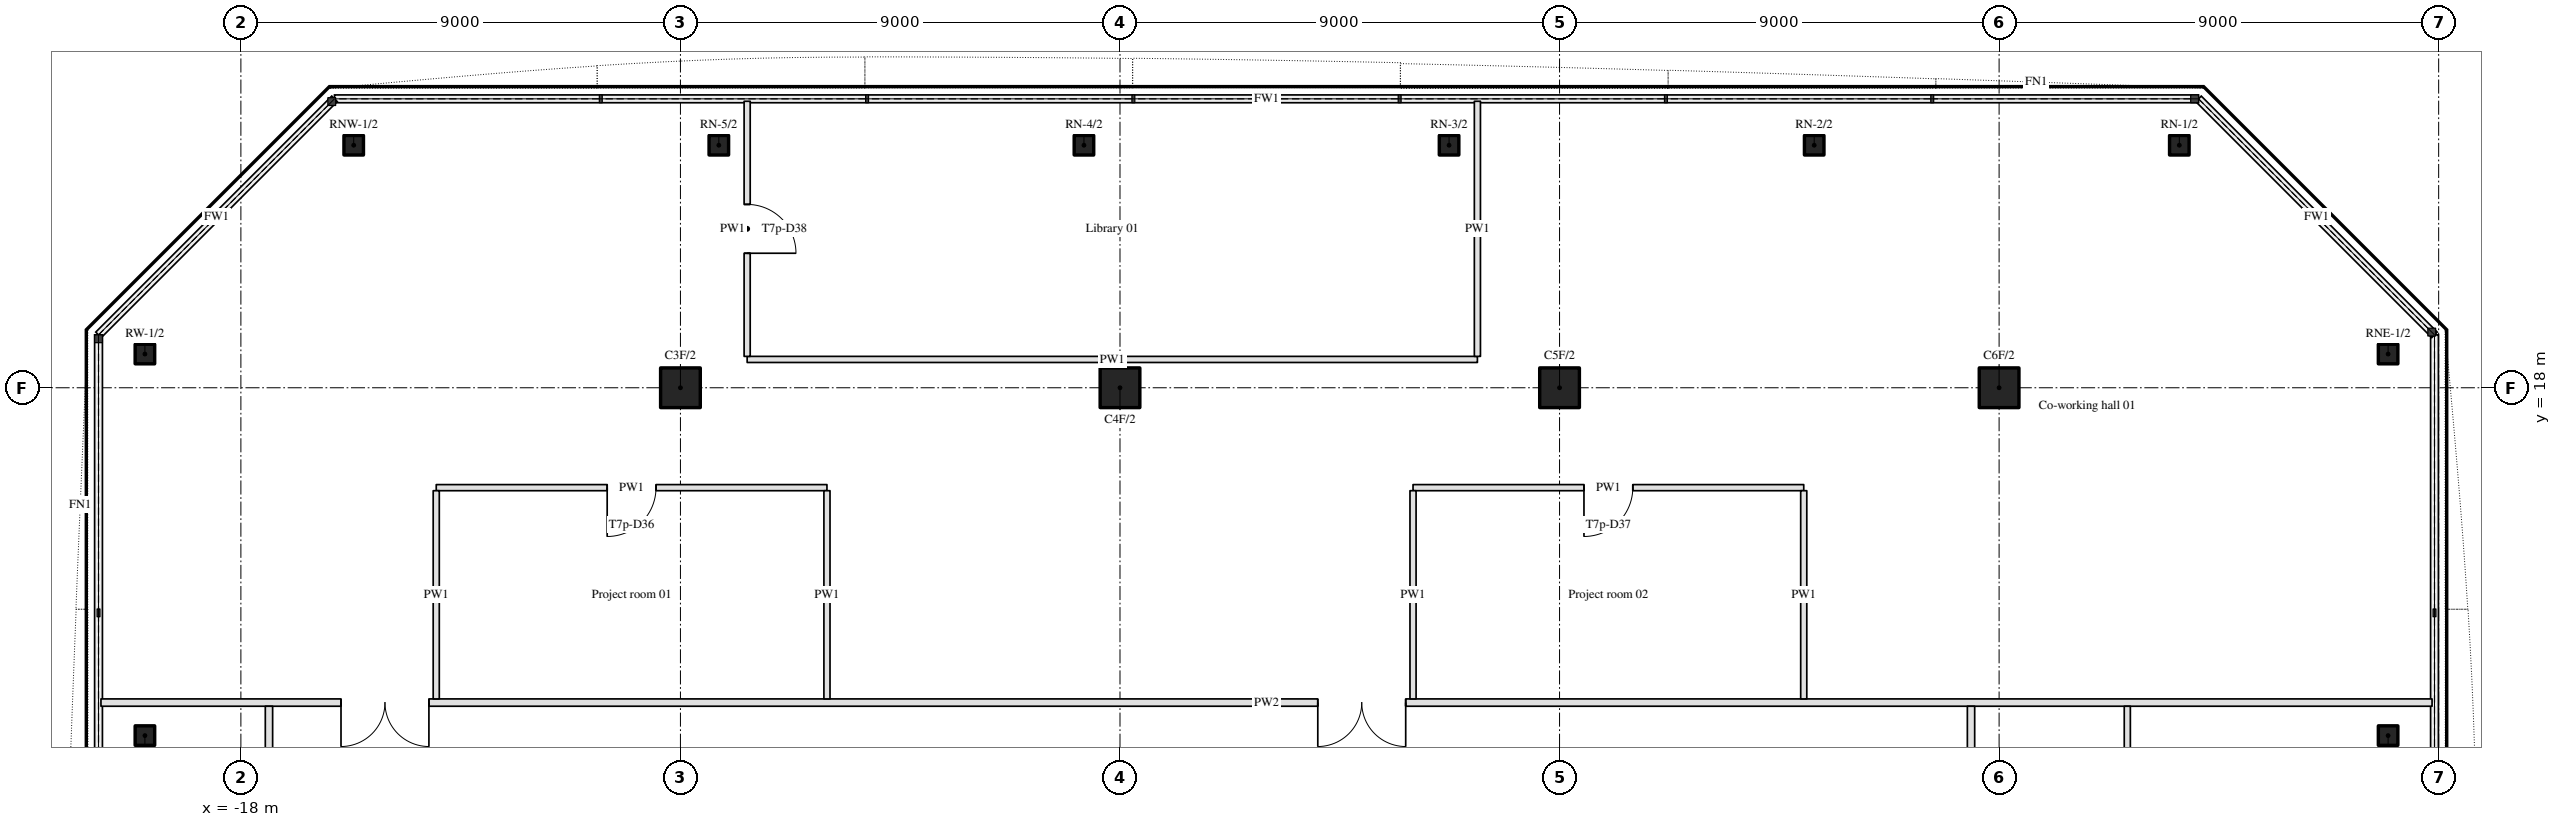
"""IFC4 building model, lengths in metres.
Left out: names, types, materials, properties, quantities, classifications, styles, units other than length and angle.
Written with IfcOpenShell. Run it as: python <this file> out.ifc"""

import sys

from ifc_helpers import new_model, si_unit, direction, frame, frame_2d, origin, origin_2d, place, context, subcontext, project, spatial, rectangle, hollow_rectangle, hollow_circle, extrude, element, fill, save


model = new_model("IFC4")
c1 = context("Model", 3, precision=1e-05, world=origin(), true_north=direction((0.0, 1.0)))
c2 = subcontext(c1, "Body", "Model", "MODEL_VIEW")
j1 = project(units=[si_unit("LENGTHUNIT", "METRE"), si_unit("PLANEANGLEUNIT", "RADIAN")], contexts=[c1])
p1 = place(None, origin())
s1 = spatial("IfcSite", under=j1, at=p1, CompositionType="ELEMENT")
p2 = place(p1, origin())
s2 = spatial("IfcBuilding", under=s1, at=p2, CompositionType="ELEMENT")
p3 = place(p2, frame((0.0, 0.0, 105.0)))
s3 = spatial("IfcBuildingStorey", under=s2, at=p3, CompositionType="ELEMENT", Elevation=105.0)
for number, where, z_axis, x_axis in (
    (1, (-9.0, 18.0, 0.0), (0.0, 0.0, 1.0), (1.0, 0.0, 0.0)),
    (2, (0.0, 18.0, 0.0), (0.0, 0.0, 1.0), (1.0, 0.0, 0.0)),
    (3, (9.0, 18.0, 0.0), (0.0, 0.0, 1.0), (1.0, 0.0, 0.0)),
    (4, (18.0, 18.0, 0.0), (0.0, 0.0, 1.0), (1.0, 0.0, 0.0)),
):
    element("IfcColumn", number, at=place(p3, frame(where, z_axis=z_axis, x_axis=x_axis)), inside=s3, PredefinedType="COLUMN", context=c2, shape_type="SweptSolid", body=[
        extrude(hollow_circle(Radius=0.406, WallThickness=0.036, at=origin_2d()), origin(), (0.0, 0.0, 1.0), 3.9),
    ])
for number, where, z_axis, x_axis in (
    (5, (25.965, 10.879, 0.0), (0.0, 0.0, 1.0), (1.0, 0.0, 0.0)),
    (6, (25.965, 18.69, 0.0), (0.0, 0.0, 1.0), (1.0, 0.0, 0.0)),
    (7, (21.69, 22.965, 0.0), (0.0, 0.0, 1.0), (1.0, 0.0, 0.0)),
    (8, (14.214, 22.965, 0.0), (0.0, 0.0, 1.0), (1.0, 0.0, 0.0)),
    (9, (6.738, 22.965, 0.0), (0.0, 0.0, 1.0), (1.0, 0.0, 0.0)),
    (10, (-0.738, 22.965, 0.0), (0.0, 0.0, 1.0), (1.0, 0.0, 0.0)),
    (11, (-8.214, 22.965, 0.0), (0.0, 0.0, 1.0), (1.0, 0.0, 0.0)),
    (12, (-15.69, 22.965, 0.0), (0.0, 0.0, 1.0), (1.0, 0.0, 0.0)),
    (13, (-19.965, 18.69, 0.0), (0.0, 0.0, 1.0), (1.0, 0.0, 0.0)),
    (14, (-19.965, 10.879, 0.0), (0.0, 0.0, 1.0), (1.0, 0.0, 0.0)),
):
    element("IfcColumn", number, at=place(p3, frame(where, z_axis=z_axis, x_axis=x_axis)), inside=s3, PredefinedType="COLUMN", context=c2, shape_type="SweptSolid", body=[
        extrude(hollow_rectangle(XDim=0.4, YDim=0.4, WallThickness=0.025, InnerFilletRadius=0.038, OuterFilletRadius=0.062, at=origin_2d()), origin(), (0.0, 0.0, 1.0), 3.9),
    ])
p4 = place(p3, frame((26.865, 11.555, 0.0), z_axis=(0.0, 0.0, 1.0), x_axis=(-1.0, 0.0, 0.0)))
e15 = element("IfcWall", 15, at=p4, inside=s3, PredefinedType="PARTITIONING", context=c2, shape_type="SweptSolid", body=[
    extrude(rectangle(XDim=47.73, YDim=0.15, at=frame_2d((23.865, 0.0))), origin(), (0.0, 0.0, 1.0), 2.96),
])
p5 = place(p4, frame((41.015, 0.0, 0.0)))
e16 = element("IfcOpeningElement", 16, at=p5, cuts=e15, PredefinedType="OPENING", context=c2, shape_type="SweptSolid", body=[
    extrude(rectangle(XDim=1.8, YDim=2.1, at=frame_2d((0.9, 1.05))), frame((0.0, 0.085, 0.0), z_axis=(0.0, -1.0, 0.0), x_axis=(1.0, 0.0, 0.0)), (0.0, 0.0, 1.0), 0.17),
])
p6 = place(p4, frame((21.015, 0.0, 0.0)))
e17 = element("IfcOpeningElement", 17, at=p6, cuts=e15, PredefinedType="OPENING", context=c2, shape_type="SweptSolid", body=[
    extrude(rectangle(XDim=1.8, YDim=2.1, at=frame_2d((0.9, 1.05))), frame((0.0, 0.085, 0.0), z_axis=(0.0, -1.0, 0.0), x_axis=(1.0, 0.0, 0.0)), (0.0, 0.0, 1.0), 0.17),
])
p7 = place(p3, frame((-6.0, 15.955, 0.0), z_axis=(0.0, 0.0, 1.0), x_axis=(-1.0, 0.0, 0.0)))
e18 = element("IfcWall", 18, at=p7, inside=s3, PredefinedType="PARTITIONING", context=c2, shape_type="SweptSolid", body=[
    extrude(rectangle(XDim=8.0, YDim=0.125, at=frame_2d((4.0, 0.0))), origin(), (0.0, 0.0, 1.0), 2.96),
])
p8 = place(p7, frame((3.5, 0.0, 0.0)))
e19 = element("IfcOpeningElement", 19, at=p8, cuts=e18, PredefinedType="OPENING", context=c2, shape_type="SweptSolid", body=[
    extrude(rectangle(XDim=1.0, YDim=2.1, at=frame_2d((0.5, 1.05))), frame((0.0, 0.073, 0.0), z_axis=(0.0, -1.0, 0.0), x_axis=(1.0, 0.0, 0.0)), (0.0, 0.0, 1.0), 0.145),
])
p9 = place(p3, frame((14.0, 15.955, 0.0), z_axis=(0.0, 0.0, 1.0), x_axis=(-1.0, 0.0, 0.0)))
e20 = element("IfcWall", 20, at=p9, inside=s3, PredefinedType="PARTITIONING", context=c2, shape_type="SweptSolid", body=[
    extrude(rectangle(XDim=8.0, YDim=0.125, at=frame_2d((4.0, 0.0))), origin(), (0.0, 0.0, 1.0), 2.96),
])
p10 = place(p9, frame((3.5, 0.0, 0.0)))
e21 = element("IfcOpeningElement", 21, at=p10, cuts=e20, PredefinedType="OPENING", context=c2, shape_type="SweptSolid", body=[
    extrude(rectangle(XDim=1.0, YDim=2.1, at=frame_2d((0.5, 1.05))), frame((0.0, 0.073, 0.0), z_axis=(0.0, -1.0, 0.0), x_axis=(1.0, 0.0, 0.0)), (0.0, 0.0, 1.0), 0.145),
])
p11 = place(p3, frame((-7.634, 18.58, 0.0), z_axis=(0.0, 0.0, 1.0), x_axis=(1.0, 0.0, 0.0)))
e22 = element("IfcWall", 22, at=p11, inside=s3, PredefinedType="PARTITIONING", context=c2, shape_type="SweptSolid", body=[
    extrude(rectangle(XDim=14.952, YDim=0.125, at=frame_2d((7.476, 0.0))), origin(), (0.0, 0.0, 1.0), 2.96),
])
p12 = place(p3, frame((-17.425, -14.925, 0.0), z_axis=(0.0, 0.0, 1.0), x_axis=(0.0, 1.0, 0.0)))
e23 = element("IfcWall", 23, at=p12, inside=s3, PredefinedType="PARTITIONING", context=c2, shape_type="SweptSolid", body=[
    extrude(rectangle(XDim=26.405, YDim=0.15, at=frame_2d((13.203, 0.0))), origin(), (0.0, 0.0, 1.0), 2.96),
])
p13 = place(p12, frame((0.712, 0.0, 0.0)))
e24 = element("IfcOpeningElement", 24, at=p13, cuts=e23, PredefinedType="OPENING", context=c2, shape_type="SweptSolid", body=[
    extrude(rectangle(XDim=1.0, YDim=2.1, at=frame_2d((0.5, 1.05))), frame((0.0, 0.085, 0.0), z_axis=(0.0, -1.0, 0.0), x_axis=(1.0, 0.0, 0.0)), (0.0, 0.0, 1.0), 0.17),
])
p14 = place(p12, frame((14.168, 0.0, 0.0)))
e25 = element("IfcOpeningElement", 25, at=p14, cuts=e23, PredefinedType="OPENING", context=c2, shape_type="SweptSolid", body=[
    extrude(rectangle(XDim=1.0, YDim=2.1, at=frame_2d((0.5, 1.05))), frame((0.0, 0.085, 0.0), z_axis=(0.0, -1.0, 0.0), x_axis=(1.0, 0.0, 0.0)), (0.0, 0.0, 1.0), 0.17),
])
p15 = place(p12, frame((21.052, 0.0, 0.0)))
e26 = element("IfcOpeningElement", 26, at=p15, cuts=e23, PredefinedType="OPENING", context=c2, shape_type="SweptSolid", body=[
    extrude(rectangle(XDim=1.0, YDim=2.1, at=frame_2d((0.5, 1.05))), frame((0.0, 0.085, 0.0), z_axis=(0.0, -1.0, 0.0), x_axis=(1.0, 0.0, 0.0)), (0.0, 0.0, 1.0), 0.17),
])
p16 = place(p3, frame((-14.0, 11.63, 0.0), z_axis=(0.0, 0.0, 1.0), x_axis=(0.0, 1.0, 0.0)))
e27 = element("IfcWall", 27, at=p16, inside=s3, PredefinedType="PARTITIONING", context=c2, shape_type="SweptSolid", body=[
    extrude(rectangle(XDim=4.263, YDim=0.125, at=frame_2d((2.131, 0.0))), origin(), (0.0, 0.0, 1.0), 2.96),
])
p17 = place(p3, frame((-7.634, 23.865, 0.0), z_axis=(0.0, 0.0, 1.0), x_axis=(0.0, -1.0, 0.0)))
e28 = element("IfcWall", 28, at=p17, inside=s3, PredefinedType="PARTITIONING", context=c2, shape_type="SweptSolid", body=[
    extrude(rectangle(XDim=5.222, YDim=0.125, at=frame_2d((2.611, 0.0))), origin(), (0.0, 0.0, 1.0), 2.96),
])
p18 = place(p17, frame((2.111, 0.0, 0.0)))
e29 = element("IfcOpeningElement", 29, at=p18, cuts=e28, PredefinedType="OPENING", context=c2, shape_type="SweptSolid", body=[
    extrude(rectangle(XDim=1.0, YDim=2.1, at=frame_2d((0.5, 1.05))), frame((0.0, 0.073, 0.0), z_axis=(0.0, -1.0, 0.0), x_axis=(1.0, 0.0, 0.0)), (0.0, 0.0, 1.0), 0.145),
])
for number, where, z_axis, x_axis in (
    (30, (-6.0, 11.63, 0.0), (0.0, 0.0, 1.0), (0.0, 1.0, 0.0)),
    (31, (6.0, 11.63, 0.0), (0.0, 0.0, 1.0), (0.0, 1.0, 0.0)),
):
    element("IfcWall", number, at=place(p3, frame(where, z_axis=z_axis, x_axis=x_axis)), inside=s3, PredefinedType="PARTITIONING", context=c2, shape_type="SweptSolid", body=[
        extrude(rectangle(XDim=4.263, YDim=0.125, at=frame_2d((2.131, 0.0))), origin(), (0.0, 0.0, 1.0), 2.96),
    ])
p19 = place(p3, frame((7.318, 18.643, 0.0), z_axis=(0.0, 0.0, 1.0), x_axis=(0.0, 1.0, 0.0)))
e32 = element("IfcWall", 32, at=p19, inside=s3, PredefinedType="PARTITIONING", context=c2, shape_type="SweptSolid", body=[
    extrude(rectangle(XDim=5.222, YDim=0.125, at=frame_2d((2.611, 0.0))), origin(), (0.0, 0.0, 1.0), 2.96),
])
p20 = place(p3, frame((14.0, 11.63, 0.0), z_axis=(0.0, 0.0, 1.0), x_axis=(0.0, 1.0, 0.0)))
e33 = element("IfcWall", 33, at=p20, inside=s3, PredefinedType="PARTITIONING", context=c2, shape_type="SweptSolid", body=[
    extrude(rectangle(XDim=4.263, YDim=0.125, at=frame_2d((2.131, 0.0))), origin(), (0.0, 0.0, 1.0), 2.96),
])
p21 = place(p3, frame((17.425, -14.925, 0.0), z_axis=(0.0, 0.0, 1.0), x_axis=(0.0, 1.0, 0.0)))
e34 = element("IfcWall", 34, at=p21, inside=s3, PredefinedType="PARTITIONING", context=c2, shape_type="SweptSolid", body=[
    extrude(rectangle(XDim=26.405, YDim=0.15, at=frame_2d((13.203, 0.0))), origin(), (0.0, 0.0, 1.0), 2.96),
])
p22 = place(p21, frame((0.312, 0.0, 0.0)))
e35 = element("IfcOpeningElement", 35, at=p22, cuts=e34, PredefinedType="OPENING", context=c2, shape_type="SweptSolid", body=[
    extrude(rectangle(XDim=1.8, YDim=2.1, at=frame_2d((0.9, 1.05))), frame((0.0, 0.085, 0.0), z_axis=(0.0, -1.0, 0.0), x_axis=(1.0, 0.0, 0.0)), (0.0, 0.0, 1.0), 0.17),
])
p23 = place(p21, frame((12.592, 0.0, 0.0)))
e36 = element("IfcOpeningElement", 36, at=p23, cuts=e34, PredefinedType="OPENING", context=c2, shape_type="SweptSolid", body=[
    extrude(rectangle(XDim=1.8, YDim=2.1, at=frame_2d((0.9, 1.05))), frame((0.0, 0.085, 0.0), z_axis=(0.0, -1.0, 0.0), x_axis=(1.0, 0.0, 0.0)), (0.0, 0.0, 1.0), 0.17),
])
p24 = place(p21, frame((21.551, 0.0, 0.0)))
e37 = element("IfcOpeningElement", 37, at=p24, cuts=e34, PredefinedType="OPENING", context=c2, shape_type="SweptSolid", body=[
    extrude(rectangle(XDim=1.8, YDim=2.1, at=frame_2d((0.9, 1.05))), frame((0.0, 0.085, 0.0), z_axis=(0.0, -1.0, 0.0), x_axis=(1.0, 0.0, 0.0)), (0.0, 0.0, 1.0), 0.17),
])
p25 = place(p3, frame((20.625, 11.48, 0.0), z_axis=(0.0, 0.0, 1.0), x_axis=(0.0, -1.0, 0.0)))
e38 = element("IfcWall", 38, at=p25, inside=s3, PredefinedType="PARTITIONING", context=c2, shape_type="SweptSolid", body=[
    extrude(rectangle(XDim=15.567, YDim=0.125, at=frame_2d((7.783, 0.0))), origin(), (0.0, 0.0, 1.0), 2.96),
])
p26 = place(p25, frame((11.199, 0.0, 0.0)))
e39 = element("IfcOpeningElement", 39, at=p26, cuts=e38, PredefinedType="OPENING", context=c2, shape_type="SweptSolid", body=[
    extrude(rectangle(XDim=1.0, YDim=2.1, at=frame_2d((0.5, 1.05))), frame((0.0, 0.073, 0.0), z_axis=(0.0, -1.0, 0.0), x_axis=(1.0, 0.0, 0.0)), (0.0, 0.0, 1.0), 0.145),
])
p27 = place(p25, frame((3.466, 0.0, 0.0)))
e40 = element("IfcOpeningElement", 40, at=p27, cuts=e38, PredefinedType="OPENING", context=c2, shape_type="SweptSolid", body=[
    extrude(rectangle(XDim=0.9, YDim=2.1, at=frame_2d((0.45, 1.05))), frame((0.0, 0.073, 0.0), z_axis=(0.0, -1.0, 0.0), x_axis=(1.0, 0.0, 0.0)), (0.0, 0.0, 1.0), 0.145),
])
p28 = place(p5, origin())
e41 = element("IfcDoor", 41, at=p28, inside=s3, OperationType="DOUBLE_DOOR_SINGLE_SWING", PredefinedType="DOOR", context=c2, shape_type="SweptSolid", body=[
    extrude(rectangle(XDim=1.8, YDim=2.1, at=frame_2d((0.9, 1.05))), frame((0.0, 0.025, 0.0), z_axis=(0.0, -1.0, 0.0), x_axis=(1.0, 0.0, 0.0)), (0.0, 0.0, 1.0), 0.05),
])
fill(e16, e41)
p29 = place(p6, origin())
e42 = element("IfcDoor", 42, at=p29, inside=s3, OperationType="DOUBLE_DOOR_SINGLE_SWING", PredefinedType="DOOR", context=c2, shape_type="SweptSolid", body=[
    extrude(rectangle(XDim=1.8, YDim=2.1, at=frame_2d((0.9, 1.05))), frame((0.0, 0.025, 0.0), z_axis=(0.0, -1.0, 0.0), x_axis=(1.0, 0.0, 0.0)), (0.0, 0.0, 1.0), 0.05),
])
fill(e17, e42)
p30 = place(p18, origin())
e43 = element("IfcDoor", 43, at=p30, inside=s3, OperationType="SINGLE_SWING_RIGHT", PredefinedType="DOOR", context=c2, shape_type="SweptSolid", body=[
    extrude(rectangle(XDim=1.0, YDim=2.1, at=frame_2d((0.5, 1.05))), frame((0.0, 0.025, 0.0), z_axis=(0.0, -1.0, 0.0), x_axis=(1.0, 0.0, 0.0)), (0.0, 0.0, 1.0), 0.05),
])
fill(e29, e43)
p31 = place(p8, origin())
e44 = element("IfcDoor", 44, at=p31, inside=s3, OperationType="SINGLE_SWING_RIGHT", PredefinedType="DOOR", context=c2, shape_type="SweptSolid", body=[
    extrude(rectangle(XDim=1.0, YDim=2.1, at=frame_2d((0.5, 1.05))), frame((0.0, 0.025, 0.0), z_axis=(0.0, -1.0, 0.0), x_axis=(1.0, 0.0, 0.0)), (0.0, 0.0, 1.0), 0.05),
])
fill(e19, e44)
p32 = place(p10, origin())
e45 = element("IfcDoor", 45, at=p32, inside=s3, OperationType="SINGLE_SWING_RIGHT", PredefinedType="DOOR", context=c2, shape_type="SweptSolid", body=[
    extrude(rectangle(XDim=1.0, YDim=2.1, at=frame_2d((0.5, 1.05))), frame((0.0, 0.025, 0.0), z_axis=(0.0, -1.0, 0.0), x_axis=(1.0, 0.0, 0.0)), (0.0, 0.0, 1.0), 0.05),
])
fill(e21, e45)
save(model, sys.argv[1])
